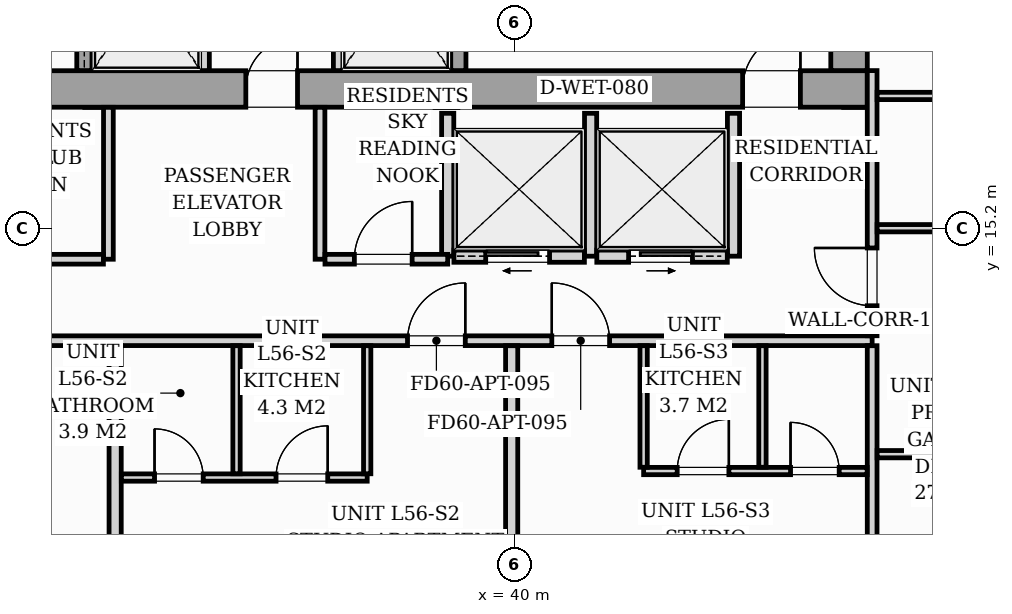
"""IFC4 building model, lengths in metres.
Left out: names, types, materials, properties, quantities, classifications, styles, units other than length and angle.
Written with IfcOpenShell. Run it as: python <this file> out.ifc"""

import sys

from ifc_helpers import new_model, si_unit, direction, frame, frame_2d, origin, origin_2d, place, context, subcontext, project, spatial, rectangle, i_section, extrude, source, transform, mapped, element, fill, save


model = new_model("IFC4")
c1 = context("Model", 3, precision=1e-05, world=origin(), true_north=direction((0.0, 1.0)))
c2 = subcontext(c1, "Body", "Model", "MODEL_VIEW")
j1 = project(units=[si_unit("LENGTHUNIT", "METRE"), si_unit("PLANEANGLEUNIT", "RADIAN")], contexts=[c1])
p1 = place(None, origin())
s1 = spatial("IfcSite", under=j1, at=p1, CompositionType="ELEMENT")
p2 = place(p1, origin())
s2 = spatial("IfcBuilding", under=s1, at=p2, CompositionType="ELEMENT")
p3 = place(p2, frame((0.0, 0.0, 195.4)))
s3 = spatial("IfcBuildingStorey", under=s2, at=p3, CompositionType="ELEMENT", Elevation=195.4)
m1 = source(origin(), c2, "Body", "SweptSolid", [
    extrude(i_section(OverallWidth=0.416, OverallDepth=0.446, WebThickness=0.039, FlangeThickness=0.063, FilletRadius=0.018, at=origin_2d()), origin(), (0.0, 0.0, 1.0), 3.196),
])
for number, where, z_axis, x_axis in (
    (1, (33.12, 17.4, 0.002), (0.0, 0.0, 1.0), (1.0, 0.0, 0.0)),
    (2, (38.88, 17.4, 0.002), (0.0, 0.0, 1.0), (1.0, 0.0, 0.0)),
    (3, (45.6, 17.4, 0.002), (0.0, 0.0, 1.0), (1.0, 0.0, 0.0)),
):
    element("IfcColumn", number, at=place(p3, frame(where, z_axis=z_axis, x_axis=x_axis)), inside=s3, PredefinedType="PILASTER", context=c2, shape_type="MappedRepresentation", body=[
        mapped(m1, transform((0.0, 0.0, 0.0), scale=1.0)),
    ])
p4 = place(p3, frame((26.2, 17.5, 0.0), z_axis=(0.0, 0.0, 1.0), x_axis=(1.0, 0.0, 0.0)))
e4 = element("IfcWall", 4, at=p4, inside=s3, PredefinedType="SHEAR", context=c2, shape_type="SweptSolid", body=[
    extrude(rectangle(XDim=19.6, YDim=0.6, at=frame_2d((9.8, 0.0))), origin(), (0.0, 0.0, 1.0), 3.2),
])
p5 = place(p4, frame((0.95, 0.0, 0.0)))
e5 = element("IfcOpeningElement", 5, at=p5, cuts=e4, PredefinedType="OPENING", context=c2, shape_type="SweptSolid", body=[
    extrude(rectangle(XDim=0.95, YDim=2.06, at=frame_2d((0.475, 1.03))), frame((0.0, 0.31, 0.0), z_axis=(0.0, -1.0, 0.0), x_axis=(1.0, 0.0, 0.0)), (0.0, 0.0, 1.0), 0.62),
])
p6 = place(p4, frame((9.38, 0.0, 0.0)))
e6 = element("IfcOpeningElement", 6, at=p6, cuts=e4, PredefinedType="OPENING", context=c2, shape_type="SweptSolid", body=[
    extrude(rectangle(XDim=0.85, YDim=2.0, at=frame_2d((0.425, 1.0))), frame((0.0, 0.31, 0.0), z_axis=(0.0, -1.0, 0.0), x_axis=(1.0, 0.0, 0.0)), (0.0, 0.0, 1.0), 0.62),
])
p7 = place(p4, frame((17.55, 0.0, 0.0)))
e7 = element("IfcOpeningElement", 7, at=p7, cuts=e4, PredefinedType="OPENING", context=c2, shape_type="SweptSolid", body=[
    extrude(rectangle(XDim=0.95, YDim=2.06, at=frame_2d((0.475, 1.03))), frame((0.0, 0.31, 0.0), z_axis=(0.0, -1.0, 0.0), x_axis=(1.0, 0.0, 0.0)), (0.0, 0.0, 1.0), 0.62),
])
p8 = place(p3, frame((45.5, 17.802, 0.0), z_axis=(0.0, 0.0, 1.0), x_axis=(0.0, 1.0, 0.0)))
e8 = element("IfcWall", 8, at=p8, inside=s3, PredefinedType="SHEAR", context=c2, shape_type="SweptSolid", body=[
    extrude(rectangle(XDim=5.796, YDim=0.6, at=frame_2d((2.898, 0.0))), origin(), (0.0, 0.0, 1.0), 3.2),
])
p9 = place(p3, frame((32.925, 17.802, 0.0), z_axis=(0.0, 0.0, 1.0), x_axis=(0.0, 1.0, 0.0)))
e9 = element("IfcWall", 9, at=p9, inside=s3, PredefinedType="SOLIDWALL", context=c2, shape_type="SweptSolid", body=[
    extrude(rectangle(XDim=2.646, YDim=0.25, at=frame_2d((1.323, 0.0))), origin(), (0.0, 0.0, 1.0), 3.2),
])
p10 = place(p9, frame((0.548, 0.0, 0.0)))
e10 = element("IfcOpeningElement", 10, at=p10, cuts=e9, PredefinedType="OPENING", context=c2, shape_type="SweptSolid", body=[
    extrude(rectangle(XDim=1.1, YDim=2.08, at=frame_2d((0.55, 1.04))), frame((0.0, 0.135, 0.0), z_axis=(0.0, -1.0, 0.0), x_axis=(1.0, 0.0, 0.0)), (0.0, 0.0, 1.0), 0.27),
])
for number, where, z_axis, x_axis in (
    (11, (34.9, 17.802, 0.0), (0.0, 0.0, 1.0), (0.0, 1.0, 0.0)),
    (12, (37.1, 17.802, 0.0), (0.0, 0.0, 1.0), (0.0, 1.0, 0.0)),
):
    element("IfcWall", number, at=place(p3, frame(where, z_axis=z_axis, x_axis=x_axis)), inside=s3, PredefinedType="PARTITIONING", context=c2, shape_type="SweptSolid", body=[
        extrude(rectangle(XDim=2.646, YDim=0.16, at=frame_2d((1.323, 0.0))), origin(), (0.0, 0.0, 1.0), 2.94),
    ])
p11 = place(p3, frame((39.075, 17.802, 0.0), z_axis=(0.0, 0.0, 1.0), x_axis=(0.0, 1.0, 0.0)))
e13 = element("IfcWall", 13, at=p11, inside=s3, PredefinedType="SOLIDWALL", context=c2, shape_type="SweptSolid", body=[
    extrude(rectangle(XDim=2.646, YDim=0.25, at=frame_2d((1.323, 0.0))), origin(), (0.0, 0.0, 1.0), 3.2),
])
p12 = place(p11, frame((0.548, 0.0, 0.0)))
e14 = element("IfcOpeningElement", 14, at=p12, cuts=e13, PredefinedType="OPENING", context=c2, shape_type="SweptSolid", body=[
    extrude(rectangle(XDim=1.1, YDim=2.08, at=frame_2d((0.55, 1.04))), frame((0.0, 0.135, 0.0), z_axis=(0.0, -1.0, 0.0), x_axis=(1.0, 0.0, 0.0)), (0.0, 0.0, 1.0), 0.27),
])
for number, where, z_axis, x_axis in (
    (15, (38.9, 14.75, 0.0), (0.0, 0.0, 1.0), (0.0, 1.0, 0.0)),
    (16, (41.25, 14.75, 0.0), (0.0, 0.0, 1.0), (0.0, 1.0, 0.0)),
    (17, (43.6, 14.75, 0.0), (0.0, 0.0, 1.0), (0.0, 1.0, 0.0)),
):
    element("IfcWall", number, at=place(p3, frame(where, z_axis=z_axis, x_axis=x_axis)), inside=s3, PredefinedType="PARTITIONING", context=c2, shape_type="SweptSolid", body=[
        extrude(rectangle(XDim=2.35, YDim=0.2, at=frame_2d((1.175, 0.0))), origin(), (0.0, 0.0, 1.0), 2.94),
    ])
p13 = place(p3, frame((39.002, 14.75, 0.0), z_axis=(0.0, 0.0, 1.0), x_axis=(1.0, 0.0, 0.0)))
e18 = element("IfcWall", 18, at=p13, inside=s3, PredefinedType="PARTITIONING", context=c2, shape_type="SweptSolid", body=[
    extrude(rectangle(XDim=2.146, YDim=0.2, at=frame_2d((1.073, 0.0))), origin(), (0.0, 0.0, 1.0), 2.94),
])
p14 = place(p13, frame((0.523, 0.0, 0.0)))
e19 = element("IfcOpeningElement", 19, at=p14, cuts=e18, PredefinedType="OPENING", context=c2, shape_type="SweptSolid", body=[
    extrude(rectangle(XDim=1.05, YDim=2.08, at=frame_2d((0.525, 1.04))), frame((0.0, 0.11, 0.0), z_axis=(0.0, -1.0, 0.0), x_axis=(1.0, 0.0, 0.0)), (0.0, 0.0, 1.0), 0.22),
])
p15 = place(p3, frame((41.352, 14.75, 0.0), z_axis=(0.0, 0.0, 1.0), x_axis=(1.0, 0.0, 0.0)))
e20 = element("IfcWall", 20, at=p15, inside=s3, PredefinedType="PARTITIONING", context=c2, shape_type="SweptSolid", body=[
    extrude(rectangle(XDim=2.146, YDim=0.2, at=frame_2d((1.073, 0.0))), origin(), (0.0, 0.0, 1.0), 2.94),
])
p16 = place(p15, frame((0.523, 0.0, 0.0)))
e21 = element("IfcOpeningElement", 21, at=p16, cuts=e20, PredefinedType="OPENING", context=c2, shape_type="SweptSolid", body=[
    extrude(rectangle(XDim=1.05, YDim=2.08, at=frame_2d((0.525, 1.04))), frame((0.0, 0.11, 0.0), z_axis=(0.0, -1.0, 0.0), x_axis=(1.0, 0.0, 0.0)), (0.0, 0.0, 1.0), 0.22),
])
p17 = place(p3, frame((26.12, 13.36, 0.0), z_axis=(0.0, 0.0, 1.0), x_axis=(1.0, 0.0, 0.0)))
e22 = element("IfcWall", 22, at=p17, inside=s3, PredefinedType="PARTITIONING", context=c2, shape_type="SweptSolid", body=[
    extrude(rectangle(XDim=19.76, YDim=0.16, at=frame_2d((9.88, 0.0))), origin(), (0.0, 0.0, 1.0), 2.94),
])
p18 = place(p17, frame((5.221, 0.0, 0.0)))
e23 = element("IfcOpeningElement", 23, at=p18, cuts=e22, PredefinedType="OPENING", context=c2, shape_type="SweptSolid", body=[
    extrude(rectangle(XDim=0.95, YDim=2.06, at=frame_2d((0.475, 1.03))), frame((0.0, 0.09, 0.0), z_axis=(0.0, -1.0, 0.0), x_axis=(1.0, 0.0, 0.0)), (0.0, 0.0, 1.0), 0.18),
])
p19 = place(p17, frame((12.119, 0.0, 0.0)))
e24 = element("IfcOpeningElement", 24, at=p19, cuts=e22, PredefinedType="OPENING", context=c2, shape_type="SweptSolid", body=[
    extrude(rectangle(XDim=0.95, YDim=2.06, at=frame_2d((0.475, 1.03))), frame((0.0, 0.09, 0.0), z_axis=(0.0, -1.0, 0.0), x_axis=(1.0, 0.0, 0.0)), (0.0, 0.0, 1.0), 0.18),
])
p20 = place(p17, frame((14.492, 0.0, 0.0)))
e25 = element("IfcOpeningElement", 25, at=p20, cuts=e22, PredefinedType="OPENING", context=c2, shape_type="SweptSolid", body=[
    extrude(rectangle(XDim=0.95, YDim=2.06, at=frame_2d((0.475, 1.03))), frame((0.0, 0.09, 0.0), z_axis=(0.0, -1.0, 0.0), x_axis=(1.0, 0.0, 0.0)), (0.0, 0.0, 1.0), 0.18),
])
p21 = place(p3, frame((45.88, 8.981, 0.0), z_axis=(0.0, 0.0, 1.0), x_axis=(0.0, 1.0, 0.0)))
e26 = element("IfcWall", 26, at=p21, inside=s3, PredefinedType="PARTITIONING", context=c2, shape_type="SweptSolid", body=[
    extrude(rectangle(XDim=4.297, YDim=0.16, at=frame_2d((2.148, 0.0))), origin(), (0.0, 0.0, 1.0), 2.94),
])
p22 = place(p3, frame((45.88, 13.442, 0.0), z_axis=(0.0, 0.0, 1.0), x_axis=(0.0, 1.0, 0.0)))
e27 = element("IfcWall", 27, at=p22, inside=s3, PredefinedType="PARTITIONING", context=c2, shape_type="SweptSolid", body=[
    extrude(rectangle(XDim=4.36, YDim=0.16, at=frame_2d((2.18, 0.0))), origin(), (0.0, 0.0, 1.0), 2.94),
])
p23 = place(p22, frame((0.493, 0.0, 0.0)))
e28 = element("IfcOpeningElement", 28, at=p23, cuts=e27, PredefinedType="OPENING", context=c2, shape_type="SweptSolid", body=[
    extrude(rectangle(XDim=0.95, YDim=2.06, at=frame_2d((0.475, 1.03))), frame((0.0, 0.09, 0.0), z_axis=(0.0, -1.0, 0.0), x_axis=(1.0, 0.0, 0.0)), (0.0, 0.0, 1.0), 0.18),
])
p24 = place(p3, frame((33.431, 7.782, 0.0), z_axis=(0.0, 0.0, 1.0), x_axis=(0.0, 1.0, 0.0)))
e29 = element("IfcWall", 29, at=p24, inside=s3, PredefinedType="PARTITIONING", context=c2, shape_type="SweptSolid", body=[
    extrude(rectangle(XDim=5.496, YDim=0.2, at=frame_2d((2.748, 0.0))), origin(), (0.0, 0.0, 1.0), 2.94),
])
p25 = place(p3, frame((33.533, 11.11, 0.0), z_axis=(0.0, 0.0, 1.0), x_axis=(1.0, 0.0, 0.0)))
e30 = element("IfcWall", 30, at=p25, inside=s3, PredefinedType="PARTITIONING", context=c2, shape_type="SweptSolid", body=[
    extrude(rectangle(XDim=4.043, YDim=0.12, at=frame_2d((2.021, 0.0))), origin(), (0.0, 0.0, 1.0), 2.94),
])
p26 = place(p25, frame((0.546, 0.0, 0.0)))
e31 = element("IfcOpeningElement", 31, at=p26, cuts=e30, PredefinedType="OPENING", context=c2, shape_type="SweptSolid", body=[
    extrude(rectangle(XDim=0.8, YDim=2.02, at=frame_2d((0.4, 1.01))), frame((0.0, 0.07, 0.0), z_axis=(0.0, -1.0, 0.0), x_axis=(1.0, 0.0, 0.0)), (0.0, 0.0, 1.0), 0.14),
])
p27 = place(p25, frame((2.544, 0.0, 0.0)))
e32 = element("IfcOpeningElement", 32, at=p27, cuts=e30, PredefinedType="OPENING", context=c2, shape_type="SweptSolid", body=[
    extrude(rectangle(XDim=0.85, YDim=2.05, at=frame_2d((0.425, 1.025))), frame((0.0, 0.07, 0.0), z_axis=(0.0, -1.0, 0.0), x_axis=(1.0, 0.0, 0.0)), (0.0, 0.0, 1.0), 0.14),
])
for number, where, z_axis, x_axis in (
    (33, (37.576, 11.172, 0.0), (0.0, 0.0, 1.0), (0.0, 1.0, 0.0)),
    (34, (35.427, 11.172, 0.0), (0.0, 0.0, 1.0), (0.0, 1.0, 0.0)),
):
    element("IfcWall", number, at=place(p3, frame(where, z_axis=z_axis, x_axis=x_axis)), inside=s3, PredefinedType="PARTITIONING", context=c2, shape_type="SweptSolid", body=[
        extrude(rectangle(XDim=2.106, YDim=0.12, at=frame_2d((1.053, 0.0))), origin(), (0.0, 0.0, 1.0), 2.94),
    ])
p28 = place(p3, frame((39.952, 8.41, 0.0), z_axis=(0.0, 0.0, 1.0), x_axis=(0.0, 1.0, 0.0)))
e35 = element("IfcWall", 35, at=p28, inside=s3, PredefinedType="PARTITIONING", context=c2, shape_type="SweptSolid", body=[
    extrude(rectangle(XDim=4.868, YDim=0.2, at=frame_2d((2.434, 0.0))), origin(), (0.0, 0.0, 1.0), 2.94),
])
p29 = place(p3, frame((42.122, 11.217, 0.0), z_axis=(0.0, 0.0, 1.0), x_axis=(1.0, 0.0, 0.0)))
e36 = element("IfcWall", 36, at=p29, inside=s3, PredefinedType="PARTITIONING", context=c2, shape_type="SweptSolid", body=[
    extrude(rectangle(XDim=3.676, YDim=0.12, at=frame_2d((1.838, 0.0))), origin(), (0.0, 0.0, 1.0), 2.94),
])
p30 = place(p29, frame((0.552, 0.0, 0.0)))
e37 = element("IfcOpeningElement", 37, at=p30, cuts=e36, PredefinedType="OPENING", context=c2, shape_type="SweptSolid", body=[
    extrude(rectangle(XDim=0.85, YDim=2.05, at=frame_2d((0.425, 1.025))), frame((0.0, 0.07, 0.0), z_axis=(0.0, -1.0, 0.0), x_axis=(1.0, 0.0, 0.0)), (0.0, 0.0, 1.0), 0.14),
])
p31 = place(p29, frame((2.416, 0.0, 0.0)))
e38 = element("IfcOpeningElement", 38, at=p31, cuts=e36, PredefinedType="OPENING", context=c2, shape_type="SweptSolid", body=[
    extrude(rectangle(XDim=0.8, YDim=2.02, at=frame_2d((0.4, 1.01))), frame((0.0, 0.07, 0.0), z_axis=(0.0, -1.0, 0.0), x_axis=(1.0, 0.0, 0.0)), (0.0, 0.0, 1.0), 0.14),
])
for number, where, z_axis, x_axis in (
    (39, (42.122, 11.279, 0.0), (0.0, 0.0, 1.0), (0.0, 1.0, 0.0)),
    (40, (44.076, 11.279, 0.0), (0.0, 0.0, 1.0), (0.0, 1.0, 0.0)),
):
    element("IfcWall", number, at=place(p3, frame(where, z_axis=z_axis, x_axis=x_axis)), inside=s3, PredefinedType="PARTITIONING", context=c2, shape_type="SweptSolid", body=[
        extrude(rectangle(XDim=1.999, YDim=0.12, at=frame_2d((1.0, 0.0))), origin(), (0.0, 0.0, 1.0), 2.94),
    ])
p32 = place(p3, frame((45.962, 17.385, 0.0), z_axis=(0.0, 0.0, 1.0), x_axis=(1.0, 0.0, 0.0)))
e41 = element("IfcWall", 41, at=p32, inside=s3, PredefinedType="PARTITIONING", context=c2, shape_type="SweptSolid", body=[
    extrude(rectangle(XDim=2.256, YDim=0.12, at=frame_2d((1.128, 0.0))), origin(), (0.0, 0.0, 1.0), 2.281),
])
p33 = place(p3, frame((45.962, 15.21, 0.0), z_axis=(0.0, 0.0, 1.0), x_axis=(1.0, 0.0, 0.0)))
e42 = element("IfcWall", 42, at=p33, inside=s3, PredefinedType="PARTITIONING", context=c2, shape_type="SweptSolid", body=[
    extrude(rectangle(XDim=2.256, YDim=0.12, at=frame_2d((1.128, 0.0))), origin(), (0.0, 0.0, 1.0), 2.94),
])
p34 = place(p3, frame((45.962, 11.494, 0.0), z_axis=(0.0, 0.0, 1.0), x_axis=(1.0, 0.0, 0.0)))
e43 = element("IfcWall", 43, at=p34, inside=s3, PredefinedType="PARTITIONING", context=c2, shape_type="SweptSolid", body=[
    extrude(rectangle(XDim=16.66, YDim=0.12, at=frame_2d((8.33, 0.0))), origin(), (0.0, 0.0, 1.0), 2.383),
])
p35 = place(p34, frame((6.186, 0.0, 0.0)))
e44 = element("IfcOpeningElement", 44, at=p35, cuts=e43, PredefinedType="OPENING", context=c2, shape_type="SweptSolid", body=[
    extrude(rectangle(XDim=0.85, YDim=2.05, at=frame_2d((0.425, 1.025))), frame((0.0, 0.07, 0.0), z_axis=(0.0, -1.0, 0.0), x_axis=(1.0, 0.0, 0.0)), (0.0, 0.0, 1.0), 0.14),
])
p36 = place(p3, frame((33.32, 14.7, 0.0), z_axis=(0.0, 0.0, 1.0), x_axis=(0.0, 1.0, 0.0)))
e45 = element("IfcWall", 45, at=p36, inside=s3, PredefinedType="PARTITIONING", context=c2, shape_type="SweptSolid", body=[
    extrude(rectangle(XDim=2.498, YDim=0.16, at=frame_2d((1.249, 0.0))), origin(), (0.0, 0.0, 1.0), 2.94),
])
p37 = place(p3, frame((28.442, 14.7, 0.0), z_axis=(0.0, 0.0, 1.0), x_axis=(1.0, 0.0, 0.0)))
e46 = element("IfcWall", 46, at=p37, inside=s3, PredefinedType="PARTITIONING", context=c2, shape_type="SweptSolid", body=[
    extrude(rectangle(XDim=4.796, YDim=0.16, at=frame_2d((2.398, 0.0))), origin(), (0.0, 0.0, 1.0), 2.94),
])
p38 = place(p37, frame((1.923, 0.0, 0.0)))
e47 = element("IfcOpeningElement", 47, at=p38, cuts=e46, PredefinedType="OPENING", context=c2, shape_type="SweptSolid", body=[
    extrude(rectangle(XDim=0.95, YDim=2.06, at=frame_2d((0.475, 1.03))), frame((0.0, 0.09, 0.0), z_axis=(0.0, -1.0, 0.0), x_axis=(1.0, 0.0, 0.0)), (0.0, 0.0, 1.0), 0.18),
])
p39 = place(p3, frame((36.8, 14.7, 0.0), z_axis=(0.0, 0.0, 1.0), x_axis=(0.0, 1.0, 0.0)))
e48 = element("IfcWall", 48, at=p39, inside=s3, PredefinedType="PARTITIONING", context=c2, shape_type="SweptSolid", body=[
    extrude(rectangle(XDim=2.498, YDim=0.16, at=frame_2d((1.249, 0.0))), origin(), (0.0, 0.0, 1.0), 2.94),
])
p40 = place(p3, frame((36.882, 14.7, 0.0), z_axis=(0.0, 0.0, 1.0), x_axis=(1.0, 0.0, 0.0)))
e49 = element("IfcWall", 49, at=p40, inside=s3, PredefinedType="PARTITIONING", context=c2, shape_type="SweptSolid", body=[
    extrude(rectangle(XDim=2.018, YDim=0.16, at=frame_2d((1.009, 0.0))), origin(), (0.0, 0.0, 1.0), 2.94),
])
p41 = place(p40, frame((0.483, 0.0, 0.0)))
e50 = element("IfcOpeningElement", 50, at=p41, cuts=e49, PredefinedType="OPENING", context=c2, shape_type="SweptSolid", body=[
    extrude(rectangle(XDim=0.95, YDim=2.06, at=frame_2d((0.475, 1.03))), frame((0.0, 0.09, 0.0), z_axis=(0.0, -1.0, 0.0), x_axis=(1.0, 0.0, 0.0)), (0.0, 0.0, 1.0), 0.18),
])
m2 = source(origin(), c2, "Body", "SweptSolid", [
    extrude(rectangle(XDim=0.85, YDim=2.0, at=frame_2d((0.425, 1.0))), frame((0.0, 0.025, 0.0), z_axis=(0.0, -1.0, 0.0), x_axis=(1.0, 0.0, 0.0)), (0.0, 0.0, 1.0), 0.05),
])
p42 = place(p6, origin())
e51 = element("IfcDoor", 51, at=p42, inside=s3, OperationType="SINGLE_SWING_RIGHT", PredefinedType="DOOR", context=c2, shape_type="MappedRepresentation", body=[
    mapped(m2, transform((0.0, 0.0, 0.0), scale=1.0)),
])
fill(e6, e51)
m3 = source(origin(), c2, "Body", "SweptSolid", [
    extrude(rectangle(XDim=0.95, YDim=2.06, at=frame_2d((0.475, 1.03))), frame((0.0, 0.025, 0.0), z_axis=(0.0, -1.0, 0.0), x_axis=(1.0, 0.0, 0.0)), (0.0, 0.0, 1.0), 0.05),
])
p43 = place(p7, origin())
e52 = element("IfcDoor", 52, at=p43, inside=s3, OperationType="SINGLE_SWING_RIGHT", PredefinedType="DOOR", context=c2, shape_type="MappedRepresentation", body=[
    mapped(m3, transform((0.0, 0.0, 0.0), scale=1.0)),
])
fill(e7, e52)
m4 = source(origin(), c2, "Body", "SweptSolid", [
    extrude(rectangle(XDim=1.05, YDim=2.08, at=frame_2d((0.525, 1.04))), frame((0.0, 0.025, 0.0), z_axis=(0.0, -1.0, 0.0), x_axis=(1.0, 0.0, 0.0)), (0.0, 0.0, 1.0), 0.05),
])
p44 = place(p14, origin())
e53 = element("IfcDoor", 53, at=p44, inside=s3, OperationType="SLIDING_TO_LEFT", PredefinedType="DOOR", context=c2, shape_type="MappedRepresentation", body=[
    mapped(m4, transform((0.0, 0.0, 0.0), scale=1.0)),
])
fill(e19, e53)
p45 = place(p16, origin())
e54 = element("IfcDoor", 54, at=p45, inside=s3, OperationType="SLIDING_TO_RIGHT", PredefinedType="DOOR", context=c2, shape_type="MappedRepresentation", body=[
    mapped(m4, transform((0.0, 0.0, 0.0), scale=1.0)),
])
fill(e21, e54)
m5 = source(origin(), c2, "Body", "SweptSolid", [
    extrude(rectangle(XDim=0.95, YDim=2.06, at=frame_2d((0.475, 1.03))), frame((0.0, 0.025, 0.0), z_axis=(0.0, -1.0, 0.0), x_axis=(1.0, 0.0, 0.0)), (0.0, 0.0, 1.0), 0.05),
])
p46 = place(p19, origin())
e55 = element("IfcDoor", 55, at=p46, inside=s3, OperationType="SINGLE_SWING_RIGHT", PredefinedType="DOOR", context=c2, shape_type="MappedRepresentation", body=[
    mapped(m5, transform((0.0, 0.0, 0.0), scale=1.0)),
])
fill(e24, e55)
m6 = source(origin(), c2, "Body", "SweptSolid", [
    extrude(rectangle(XDim=0.8, YDim=2.02, at=frame_2d((0.4, 1.01))), frame((0.0, 0.025, 0.0), z_axis=(0.0, -1.0, 0.0), x_axis=(1.0, 0.0, 0.0)), (0.0, 0.0, 1.0), 0.05),
])
p47 = place(p26, origin())
e56 = element("IfcDoor", 56, at=p47, inside=s3, OperationType="SINGLE_SWING_LEFT", PredefinedType="DOOR", context=c2, shape_type="MappedRepresentation", body=[
    mapped(m6, transform((0.0, 0.0, 0.0), scale=1.0)),
])
fill(e31, e56)
m7 = source(origin(), c2, "Body", "SweptSolid", [
    extrude(rectangle(XDim=0.85, YDim=2.05, at=frame_2d((0.425, 1.025))), frame((0.0, 0.025, 0.0), z_axis=(0.0, -1.0, 0.0), x_axis=(1.0, 0.0, 0.0)), (0.0, 0.0, 1.0), 0.05),
])
p48 = place(p27, origin())
e57 = element("IfcDoor", 57, at=p48, inside=s3, OperationType="SINGLE_SWING_RIGHT", PredefinedType="DOOR", context=c2, shape_type="MappedRepresentation", body=[
    mapped(m7, transform((0.0, 0.0, 0.0), scale=1.0)),
])
fill(e32, e57)
p49 = place(p20, origin())
e58 = element("IfcDoor", 58, at=p49, inside=s3, OperationType="SINGLE_SWING_LEFT", PredefinedType="DOOR", context=c2, shape_type="MappedRepresentation", body=[
    mapped(m5, transform((0.0, 0.0, 0.0), scale=1.0)),
])
fill(e25, e58)
p50 = place(p30, origin())
e59 = element("IfcDoor", 59, at=p50, inside=s3, OperationType="SINGLE_SWING_RIGHT", PredefinedType="DOOR", context=c2, shape_type="MappedRepresentation", body=[
    mapped(m7, transform((0.0, 0.0, 0.0), scale=1.0)),
])
fill(e37, e59)
p51 = place(p31, origin())
e60 = element("IfcDoor", 60, at=p51, inside=s3, OperationType="SINGLE_SWING_LEFT", PredefinedType="DOOR", context=c2, shape_type="MappedRepresentation", body=[
    mapped(m6, transform((0.0, 0.0, 0.0), scale=1.0)),
])
fill(e38, e60)
p52 = place(p23, origin())
e61 = element("IfcDoor", 61, at=p52, inside=s3, OperationType="SINGLE_SWING_RIGHT", PredefinedType="DOOR", context=c2, shape_type="MappedRepresentation", body=[
    mapped(m5, transform((0.0, 0.0, 0.0), scale=1.0)),
])
fill(e28, e61)
p53 = place(p41, origin())
e62 = element("IfcDoor", 62, at=p53, inside=s3, OperationType="SINGLE_SWING_RIGHT", PredefinedType="DOOR", context=c2, shape_type="MappedRepresentation", body=[
    mapped(m5, transform((0.0, 0.0, 0.0), scale=1.0)),
])
fill(e50, e62)
save(model, sys.argv[1])
